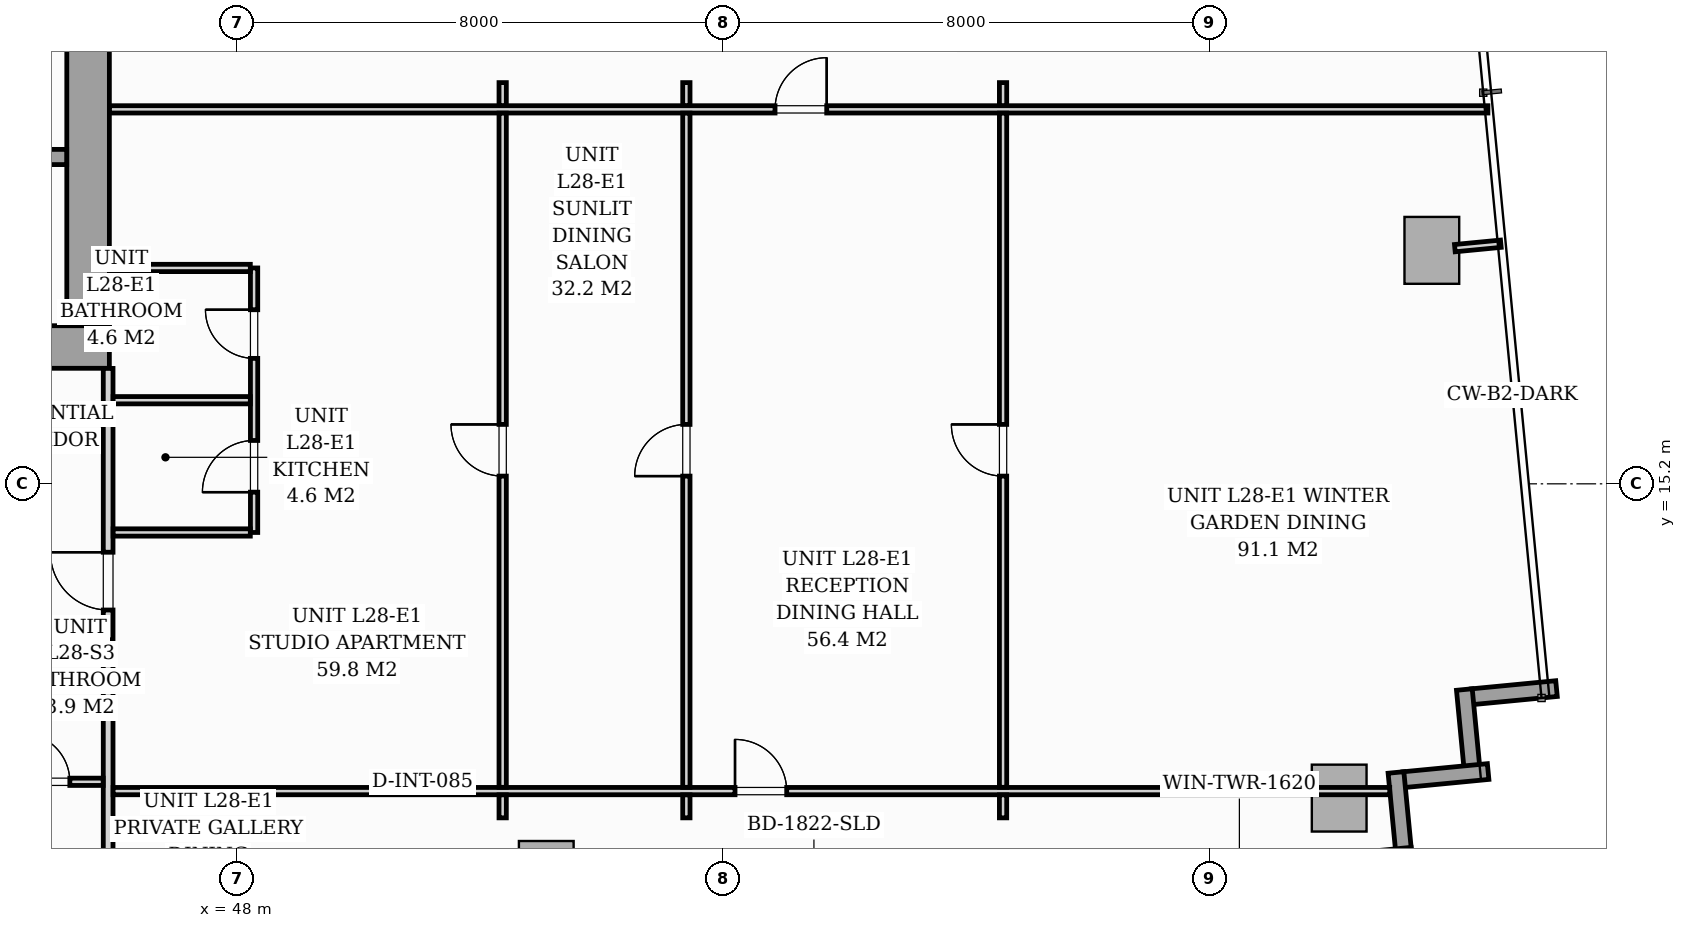
"""IFC4 building model, lengths in metres.
Left out: names, types, materials, properties, quantities, classifications, styles, units other than length and angle.
Written with IfcOpenShell. Run it as: python <this file> out.ifc"""

import sys

from ifc_helpers import new_model, si_unit, direction, frame, frame_2d, origin, origin_2d, place, context, subcontext, project, spatial, rectangle, i_section, extrude, source, transform, mapped, element, fill, save


model = new_model("IFC4")
c1 = context("Model", 3, precision=1e-05, world=origin(), true_north=direction((0.0, 1.0)))
c2 = subcontext(c1, "Body", "Model", "MODEL_VIEW")
j1 = project(units=[si_unit("LENGTHUNIT", "METRE"), si_unit("PLANEANGLEUNIT", "RADIAN")], contexts=[c1])
p1 = place(None, origin())
s1 = spatial("IfcSite", under=j1, at=p1, CompositionType="ELEMENT")
p2 = place(p1, origin())
s2 = spatial("IfcBuilding", under=s1, at=p2, CompositionType="ELEMENT")
p3 = place(p2, frame((0.0, 0.0, 100.2)))
s3 = spatial("IfcBuildingStorey", under=s2, at=p3, CompositionType="ELEMENT", Elevation=100.2)
m1 = source(origin(), c2, "Body", "SweptSolid", [
    extrude(i_section(OverallWidth=0.427, OverallDepth=0.483, WebThickness=0.051, FlangeThickness=0.082, FilletRadius=0.018, at=origin_2d()), origin(), (0.0, 0.0, 1.0), 3.196),
])
p4 = place(p3, frame((45.6, 17.4, 0.002), z_axis=(0.0, 0.0, 1.0), x_axis=(1.0, 0.0, 0.0)))
e1 = element("IfcColumn", 1, at=p4, inside=s3, PredefinedType="PILASTER", context=c2, shape_type="MappedRepresentation", body=[
    mapped(m1, transform((0.0, 0.0, 0.0), scale=1.0)),
])
m2 = source(origin(), c2, "Body", "SweptSolid", [
    extrude(rectangle(XDim=0.9, YDim=1.1, at=origin_2d()), origin(), (0.0, 0.0, 1.0), 3.196),
])
for number, where, z_axis, x_axis in (
    (2, (53.085, 8.776, 0.002), (0.0, 0.0, 1.0), (0.995, 0.096, 0.0)),
    (3, (66.125, 10.032, 0.002), (0.0, 0.0, 1.0), (0.995, 0.096, 0.0)),
    (4, (67.648, 19.039, 0.002), (0.0, 0.0, 1.0), (0.995, 0.096, 0.0)),
):
    element("IfcColumn", number, at=place(p3, frame(where, z_axis=z_axis, x_axis=x_axis)), inside=s3, PredefinedType="COLUMN", context=c2, shape_type="MappedRepresentation", body=[
        mapped(m2, transform((0.0, 0.0, 0.0), scale=1.0)),
    ])
for number, where, z_axis, x_axis in (
    (5, (69.698, 11.833, 0.0), (0.0, 0.0, 1.0), (-0.995, -0.096, 0.0)),
    (6, (68.183, 11.817, 0.0), (0.0, 0.0, 1.0), (0.096, -0.995, 0.0)),
):
    element("IfcWall", number, at=place(p3, frame(where, z_axis=z_axis, x_axis=x_axis)), inside=s3, PredefinedType="STANDARD", context=c2, shape_type="SweptSolid", body=[
        extrude(rectangle(XDim=1.395, YDim=0.26, at=frame_2d((0.697, 0.0))), origin(), (0.0, 0.0, 1.0), 2.94),
    ])
p5 = place(p3, frame((68.574, 10.469, 0.0), z_axis=(0.0, 0.0, 1.0), x_axis=(-0.99540774648, -0.095725744959, 0.0)))
e7 = element("IfcWall", 7, at=p5, inside=s3, PredefinedType="STANDARD", context=c2, shape_type="SweptSolid", body=[
    extrude(rectangle(XDim=1.395, YDim=0.26, at=frame_2d((0.698, 0.0))), origin(), (0.0, 0.0, 1.0), 2.94),
])
p6 = place(p3, frame((67.059, 10.453, 0.0), z_axis=(0.0, 0.0, 1.0), x_axis=(0.095915846097, -0.995389446633, 0.0)))
e8 = element("IfcWall", 8, at=p6, inside=s3, PredefinedType="STANDARD", context=c2, shape_type="SweptSolid", body=[
    extrude(rectangle(XDim=1.395, YDim=0.26, at=frame_2d((0.697, 0.0))), origin(), (0.0, 0.0, 1.0), 2.94),
])
p7 = place(p3, frame((67.32, 9.092, 0.0), z_axis=(0.0, 0.0, 1.0), x_axis=(-0.995396521236, -0.095842399342, 0.0)))
e9 = element("IfcWall", 9, at=p7, inside=s3, PredefinedType="STANDARD", context=c2, shape_type="SweptSolid", body=[
    extrude(rectangle(XDim=19.11, YDim=0.26, at=frame_2d((9.555, 0.0))), origin(), (0.0, 0.0, 1.0), 2.94),
])
p8 = place(p7, frame((8.979, 0.0, 0.0)))
e10 = element("IfcOpeningElement", 10, at=p8, cuts=e9, PredefinedType="OPENING", context=c2, shape_type="SweptSolid", body=[
    extrude(rectangle(XDim=1.8, YDim=2.06, at=frame_2d((0.9, 1.03))), frame((0.0, 0.14, 0.0), z_axis=(0.0, -1.0, 0.0), x_axis=(1.0, 0.0, 0.0)), (0.0, 0.0, 1.0), 0.28),
])
p9 = place(p7, frame((2.05, 0.0, 0.65)))
e11 = element("IfcOpeningElement", 11, at=p9, cuts=e9, PredefinedType="OPENING", context=c2, shape_type="SweptSolid", body=[
    extrude(rectangle(XDim=1.6, YDim=1.5, at=frame_2d((0.8, 0.75))), frame((0.0, 0.14, 0.0), z_axis=(0.0, -1.0, 0.0), x_axis=(1.0, 0.0, 0.0)), (0.0, 0.0, 1.0), 0.28),
])
p10 = place(p3, frame((26.1, 17.45, 0.0), z_axis=(0.0, 0.0, 1.0), x_axis=(1.0, 0.0, 0.0)))
e12 = element("IfcWall", 12, at=p10, inside=s3, PredefinedType="SHEAR", context=c2, shape_type="SweptSolid", body=[
    extrude(rectangle(XDim=19.8, YDim=0.7, at=frame_2d((9.9, 0.0))), origin(), (0.0, 0.0, 1.0), 3.2),
])
p11 = place(p10, frame((1.05, 0.0, 0.0)))
e13 = element("IfcOpeningElement", 13, at=p11, cuts=e12, PredefinedType="OPENING", context=c2, shape_type="SweptSolid", body=[
    extrude(rectangle(XDim=0.95, YDim=2.06, at=frame_2d((0.475, 1.03))), frame((0.0, 0.36, 0.0), z_axis=(0.0, -1.0, 0.0), x_axis=(1.0, 0.0, 0.0)), (0.0, 0.0, 1.0), 0.72),
])
p12 = place(p10, frame((9.48, 0.0, 0.0)))
e14 = element("IfcOpeningElement", 14, at=p12, cuts=e12, PredefinedType="OPENING", context=c2, shape_type="SweptSolid", body=[
    extrude(rectangle(XDim=0.85, YDim=2.0, at=frame_2d((0.425, 1.0))), frame((0.0, 0.36, 0.0), z_axis=(0.0, -1.0, 0.0), x_axis=(1.0, 0.0, 0.0)), (0.0, 0.0, 1.0), 0.72),
])
p13 = place(p10, frame((17.65, 0.0, 0.0)))
e15 = element("IfcOpeningElement", 15, at=p13, cuts=e12, PredefinedType="OPENING", context=c2, shape_type="SweptSolid", body=[
    extrude(rectangle(XDim=0.95, YDim=2.06, at=frame_2d((0.475, 1.03))), frame((0.0, 0.36, 0.0), z_axis=(0.0, -1.0, 0.0), x_axis=(1.0, 0.0, 0.0)), (0.0, 0.0, 1.0), 0.72),
])
p14 = place(p3, frame((45.55, 17.802, 0.0), z_axis=(0.0, 0.0, 1.0), x_axis=(0.0, 1.0, 0.0)))
e16 = element("IfcWall", 16, at=p14, inside=s3, PredefinedType="SHEAR", context=c2, shape_type="SweptSolid", body=[
    extrude(rectangle(XDim=5.796, YDim=0.7, at=frame_2d((2.898, 0.0))), origin(), (0.0, 0.0, 1.0), 3.2),
])
p15 = place(p3, frame((37.05, 20.575, 0.0), z_axis=(0.0, 0.0, 1.0), x_axis=(1.0, 0.0, 0.0)))
e17 = element("IfcWall", 17, at=p15, inside=s3, PredefinedType="SOLIDWALL", context=c2, shape_type="SweptSolid", body=[
    extrude(rectangle(XDim=8.148, YDim=0.25, at=frame_2d((4.074, 0.0))), origin(), (0.0, 0.0, 1.0), 3.2),
])
p16 = place(p15, frame((6.6, 0.0, 0.0)))
e18 = element("IfcOpeningElement", 18, at=p16, cuts=e17, PredefinedType="OPENING", context=c2, shape_type="SweptSolid", body=[
    extrude(rectangle(XDim=0.95, YDim=2.06, at=frame_2d((0.475, 1.03))), frame((0.0, 0.135, 0.0), z_axis=(0.0, -1.0, 0.0), x_axis=(1.0, 0.0, 0.0)), (0.0, 0.0, 1.0), 0.27),
])
p17 = place(p3, frame((21.5, 12.55, 0.0), z_axis=(0.0, 0.0, 1.0), x_axis=(1.0, 0.0, 0.0)))
e19 = element("IfcWall", 19, at=p17, inside=s3, PredefinedType="PARTITIONING", context=c2, shape_type="SweptSolid", body=[
    extrude(rectangle(XDim=24.38, YDim=0.16, at=frame_2d((12.19, 0.0))), origin(), (0.0, 0.0, 1.0), 2.94),
])
p18 = place(p17, frame((6.075, 0.0, 0.0)))
e20 = element("IfcOpeningElement", 20, at=p18, cuts=e19, PredefinedType="OPENING", context=c2, shape_type="SweptSolid", body=[
    extrude(rectangle(XDim=0.95, YDim=2.06, at=frame_2d((0.475, 1.03))), frame((0.0, 0.09, 0.0), z_axis=(0.0, -1.0, 0.0), x_axis=(1.0, 0.0, 0.0)), (0.0, 0.0, 1.0), 0.18),
])
p19 = place(p17, frame((10.519, 0.0, 0.0)))
e21 = element("IfcOpeningElement", 21, at=p19, cuts=e19, PredefinedType="OPENING", context=c2, shape_type="SweptSolid", body=[
    extrude(rectangle(XDim=0.95, YDim=2.06, at=frame_2d((0.475, 1.03))), frame((0.0, 0.09, 0.0), z_axis=(0.0, -1.0, 0.0), x_axis=(1.0, 0.0, 0.0)), (0.0, 0.0, 1.0), 0.18),
])
p20 = place(p17, frame((18.208, 0.0, 0.0)))
e22 = element("IfcOpeningElement", 22, at=p20, cuts=e19, PredefinedType="OPENING", context=c2, shape_type="SweptSolid", body=[
    extrude(rectangle(XDim=0.95, YDim=2.06, at=frame_2d((0.475, 1.03))), frame((0.0, 0.09, 0.0), z_axis=(0.0, -1.0, 0.0), x_axis=(1.0, 0.0, 0.0)), (0.0, 0.0, 1.0), 0.18),
])
p21 = place(p3, frame((45.88, 6.977, 0.0), z_axis=(0.0, 0.0, 1.0), x_axis=(0.0, 1.0, 0.0)))
e23 = element("IfcWall", 23, at=p21, inside=s3, PredefinedType="PARTITIONING", context=c2, shape_type="SweptSolid", body=[
    extrude(rectangle(XDim=5.491, YDim=0.16, at=frame_2d((2.745, 0.0))), origin(), (0.0, 0.0, 1.0), 2.94),
])
p22 = place(p3, frame((45.88, 12.632, 0.0), z_axis=(0.0, 0.0, 1.0), x_axis=(0.0, 1.0, 0.0)))
e24 = element("IfcWall", 24, at=p22, inside=s3, PredefinedType="PARTITIONING", context=c2, shape_type="SweptSolid", body=[
    extrude(rectangle(XDim=4.466, YDim=0.16, at=frame_2d((2.233, 0.0))), origin(), (0.0, 0.0, 1.0), 2.94),
])
p23 = place(p22, frame((0.493, 0.0, 0.0)))
e25 = element("IfcOpeningElement", 25, at=p23, cuts=e24, PredefinedType="OPENING", context=c2, shape_type="SweptSolid", body=[
    extrude(rectangle(XDim=0.95, YDim=2.06, at=frame_2d((0.475, 1.03))), frame((0.0, 0.09, 0.0), z_axis=(0.0, -1.0, 0.0), x_axis=(1.0, 0.0, 0.0)), (0.0, 0.0, 1.0), 0.18),
])
p24 = place(p3, frame((41.7, 10.3, 0.0), z_axis=(0.0, 0.0, 1.0), x_axis=(1.0, 0.0, 0.0)))
e26 = element("IfcWall", 26, at=p24, inside=s3, PredefinedType="PARTITIONING", context=c2, shape_type="SweptSolid", body=[
    extrude(rectangle(XDim=4.098, YDim=0.12, at=frame_2d((2.049, 0.0))), origin(), (0.0, 0.0, 1.0), 2.94),
])
p25 = place(p24, frame((0.675, 0.0, 0.0)))
e27 = element("IfcOpeningElement", 27, at=p25, cuts=e26, PredefinedType="OPENING", context=c2, shape_type="SweptSolid", body=[
    extrude(rectangle(XDim=0.85, YDim=2.05, at=frame_2d((0.425, 1.025))), frame((0.0, 0.07, 0.0), z_axis=(0.0, -1.0, 0.0), x_axis=(1.0, 0.0, 0.0)), (0.0, 0.0, 1.0), 0.14),
])
p26 = place(p24, frame((2.75, 0.0, 0.0)))
e28 = element("IfcOpeningElement", 28, at=p26, cuts=e26, PredefinedType="OPENING", context=c2, shape_type="SweptSolid", body=[
    extrude(rectangle(XDim=0.8, YDim=2.02, at=frame_2d((0.4, 1.01))), frame((0.0, 0.07, 0.0), z_axis=(0.0, -1.0, 0.0), x_axis=(1.0, 0.0, 0.0)), (0.0, 0.0, 1.0), 0.14),
])
p27 = place(p3, frame((48.28, 14.4, 0.0), z_axis=(0.0, 0.0, 1.0), x_axis=(0.0, 1.0, 0.0)))
e29 = element("IfcWall", 29, at=p27, inside=s3, PredefinedType="PARTITIONING", context=c2, shape_type="SweptSolid", body=[
    extrude(rectangle(XDim=4.35, YDim=0.12, at=frame_2d((2.175, 0.0))), origin(), (0.0, 0.0, 1.0), 2.94),
])
p28 = place(p27, frame((0.663, 0.0, 0.0)))
e30 = element("IfcOpeningElement", 30, at=p28, cuts=e29, PredefinedType="OPENING", context=c2, shape_type="SweptSolid", body=[
    extrude(rectangle(XDim=0.85, YDim=2.05, at=frame_2d((0.425, 1.025))), frame((0.0, 0.07, 0.0), z_axis=(0.0, -1.0, 0.0), x_axis=(1.0, 0.0, 0.0)), (0.0, 0.0, 1.0), 0.14),
])
p29 = place(p27, frame((2.863, 0.0, 0.0)))
e31 = element("IfcOpeningElement", 31, at=p29, cuts=e29, PredefinedType="OPENING", context=c2, shape_type="SweptSolid", body=[
    extrude(rectangle(XDim=0.8, YDim=2.02, at=frame_2d((0.4, 1.01))), frame((0.0, 0.07, 0.0), z_axis=(0.0, -1.0, 0.0), x_axis=(1.0, 0.0, 0.0)), (0.0, 0.0, 1.0), 0.14),
])
for number, where, z_axis, x_axis in (
    (32, (45.962, 16.575, 0.0), (0.0, 0.0, 1.0), (1.0, 0.0, 0.0)),
    (33, (45.962, 14.4, 0.0), (0.0, 0.0, 1.0), (1.0, 0.0, 0.0)),
):
    element("IfcWall", number, at=place(p3, frame(where, z_axis=z_axis, x_axis=x_axis)), inside=s3, PredefinedType="PARTITIONING", context=c2, shape_type="SweptSolid", body=[
        extrude(rectangle(XDim=2.256, YDim=0.12, at=frame_2d((1.128, 0.0))), origin(), (0.0, 0.0, 1.0), 2.94),
    ])
p30 = place(p3, frame((45.902, 18.75, 0.0), z_axis=(0.0, 0.0, 1.0), x_axis=(1.0, 0.0, 0.0)))
e34 = element("IfcWall", 34, at=p30, inside=s3, PredefinedType="PARTITIONING", context=c2, shape_type="SweptSolid", body=[
    extrude(rectangle(XDim=2.316, YDim=0.12, at=frame_2d((1.158, 0.0))), origin(), (0.0, 0.0, 1.0), 2.94),
])
p31 = place(p3, frame((45.902, 21.358, 0.0), z_axis=(0.0, 0.0, 1.0), x_axis=(1.0, 0.0, 0.0)))
e35 = element("IfcWall", 35, at=p31, inside=s3, PredefinedType="PARTITIONING", context=c2, shape_type="SweptSolid", body=[
    extrude(rectangle(XDim=22.668, YDim=0.12, at=frame_2d((11.334, 0.0))), origin(), (0.0, 0.0, 1.0), 2.94),
])
p32 = place(p31, frame((10.945, 0.0, 0.0)))
e36 = element("IfcOpeningElement", 36, at=p32, cuts=e35, PredefinedType="OPENING", context=c2, shape_type="SweptSolid", body=[
    extrude(rectangle(XDim=0.85, YDim=2.05, at=frame_2d((0.425, 1.025))), frame((0.0, 0.07, 0.0), z_axis=(0.0, -1.0, 0.0), x_axis=(1.0, 0.0, 0.0)), (0.0, 0.0, 1.0), 0.14),
])
p33 = place(p3, frame((45.962, 10.147, 0.0), z_axis=(0.0, 0.0, 1.0), x_axis=(1.0, 0.0, 0.0)))
e37 = element("IfcWall", 37, at=p33, inside=s3, PredefinedType="PARTITIONING", context=c2, shape_type="SweptSolid", body=[
    extrude(rectangle(XDim=20.994, YDim=0.12, at=frame_2d((10.497, 0.0))), origin(), (0.0, 0.0, 1.0), 2.31),
])
p34 = place(p33, frame((10.227, 0.0, 0.0)))
e38 = element("IfcOpeningElement", 38, at=p34, cuts=e37, PredefinedType="OPENING", context=c2, shape_type="SweptSolid", body=[
    extrude(rectangle(XDim=0.85, YDim=2.05, at=frame_2d((0.425, 1.025))), frame((0.0, 0.07, 0.0), z_axis=(0.0, -1.0, 0.0), x_axis=(1.0, 0.0, 0.0)), (0.0, 0.0, 1.0), 0.14),
])
p35 = place(p3, frame((60.597, 9.707, 0.0), z_axis=(0.0, 0.0, 1.0), x_axis=(0.0, 1.0, 0.0)))
e39 = element("IfcWall", 39, at=p35, inside=s3, PredefinedType="PARTITIONING", context=c2, shape_type="SweptSolid", body=[
    extrude(rectangle(XDim=0.378, YDim=0.12, at=frame_2d((0.189, 0.0))), origin(), (0.0, 0.0, 1.0), 2.94),
])
p36 = place(p3, frame((60.597, 10.209, 0.0), z_axis=(0.0, 0.0, 1.0), x_axis=(0.0, 1.0, 0.0)))
e40 = element("IfcWall", 40, at=p36, inside=s3, PredefinedType="PARTITIONING", context=c2, shape_type="SweptSolid", body=[
    extrude(rectangle(XDim=11.087, YDim=0.12, at=frame_2d((5.543, 0.0))), origin(), (0.0, 0.0, 1.0), 2.94),
])
p37 = place(p36, frame((5.118, 0.0, 0.0)))
e41 = element("IfcOpeningElement", 41, at=p37, cuts=e40, PredefinedType="OPENING", context=c2, shape_type="SweptSolid", body=[
    extrude(rectangle(XDim=0.85, YDim=2.05, at=frame_2d((0.425, 1.025))), frame((0.0, 0.07, 0.0), z_axis=(0.0, -1.0, 0.0), x_axis=(1.0, 0.0, 0.0)), (0.0, 0.0, 1.0), 0.14),
])
p38 = place(p3, frame((60.597, 21.42, 0.0), z_axis=(0.0, 0.0, 1.0), x_axis=(0.0, 1.0, 0.0)))
e42 = element("IfcWall", 42, at=p38, inside=s3, PredefinedType="PARTITIONING", context=c2, shape_type="SweptSolid", body=[
    extrude(rectangle(XDim=0.378, YDim=0.12, at=frame_2d((0.189, 0.0))), origin(), (0.0, 0.0, 1.0), 2.94),
])
p39 = place(p3, frame((55.389, 9.707, 0.0), z_axis=(0.0, 0.0, 1.0), x_axis=(0.0, 1.0, 0.0)))
e43 = element("IfcWall", 43, at=p39, inside=s3, PredefinedType="PARTITIONING", context=c2, shape_type="SweptSolid", body=[
    extrude(rectangle(XDim=0.378, YDim=0.12, at=frame_2d((0.189, 0.0))), origin(), (0.0, 0.0, 1.0), 2.94),
])
p40 = place(p3, frame((55.389, 10.209, 0.0), z_axis=(0.0, 0.0, 1.0), x_axis=(0.0, 1.0, 0.0)))
e44 = element("IfcWall", 44, at=p40, inside=s3, PredefinedType="PARTITIONING", context=c2, shape_type="SweptSolid", body=[
    extrude(rectangle(XDim=11.087, YDim=0.12, at=frame_2d((5.543, 0.0))), origin(), (0.0, 0.0, 1.0), 2.94),
])
p41 = place(p40, frame((5.118, 0.0, 0.0)))
e45 = element("IfcOpeningElement", 45, at=p41, cuts=e44, PredefinedType="OPENING", context=c2, shape_type="SweptSolid", body=[
    extrude(rectangle(XDim=0.85, YDim=2.05, at=frame_2d((0.425, 1.025))), frame((0.0, 0.07, 0.0), z_axis=(0.0, -1.0, 0.0), x_axis=(1.0, 0.0, 0.0)), (0.0, 0.0, 1.0), 0.14),
])
p42 = place(p3, frame((55.389, 21.42, 0.0), z_axis=(0.0, 0.0, 1.0), x_axis=(0.0, 1.0, 0.0)))
e46 = element("IfcWall", 46, at=p42, inside=s3, PredefinedType="PARTITIONING", context=c2, shape_type="SweptSolid", body=[
    extrude(rectangle(XDim=0.378, YDim=0.12, at=frame_2d((0.189, 0.0))), origin(), (0.0, 0.0, 1.0), 2.94),
])
p43 = place(p3, frame((52.368, 9.707, 0.0), z_axis=(0.0, 0.0, 1.0), x_axis=(0.0, 1.0, 0.0)))
e47 = element("IfcWall", 47, at=p43, inside=s3, PredefinedType="PARTITIONING", context=c2, shape_type="SweptSolid", body=[
    extrude(rectangle(XDim=0.378, YDim=0.12, at=frame_2d((0.189, 0.0))), origin(), (0.0, 0.0, 1.0), 2.94),
])
p44 = place(p3, frame((52.368, 10.209, 0.0), z_axis=(0.0, 0.0, 1.0), x_axis=(0.0, 1.0, 0.0)))
e48 = element("IfcWall", 48, at=p44, inside=s3, PredefinedType="PARTITIONING", context=c2, shape_type="SweptSolid", body=[
    extrude(rectangle(XDim=11.087, YDim=0.12, at=frame_2d((5.543, 0.0))), origin(), (0.0, 0.0, 1.0), 2.94),
])
p45 = place(p44, frame((5.118, 0.0, 0.0)))
e49 = element("IfcOpeningElement", 49, at=p45, cuts=e48, PredefinedType="OPENING", context=c2, shape_type="SweptSolid", body=[
    extrude(rectangle(XDim=0.85, YDim=2.05, at=frame_2d((0.425, 1.025))), frame((0.0, 0.07, 0.0), z_axis=(0.0, -1.0, 0.0), x_axis=(1.0, 0.0, 0.0)), (0.0, 0.0, 1.0), 0.14),
])
p46 = place(p3, frame((52.368, 21.42, 0.0), z_axis=(0.0, 0.0, 1.0), x_axis=(0.0, 1.0, 0.0)))
e50 = element("IfcWall", 50, at=p46, inside=s3, PredefinedType="PARTITIONING", context=c2, shape_type="SweptSolid", body=[
    extrude(rectangle(XDim=0.378, YDim=0.12, at=frame_2d((0.189, 0.0))), origin(), (0.0, 0.0, 1.0), 2.94),
])
p47 = place(p3, frame((68.027, 19.076, 0.0), z_axis=(0.0, 0.0, 1.0), x_axis=(0.995377786728, 0.096036772582, 0.0)))
e51 = element("IfcWall", 51, at=p47, inside=s3, PredefinedType="PARTITIONING", context=c2, shape_type="SweptSolid", body=[
    extrude(rectangle(XDim=0.76, YDim=0.12, at=frame_2d((0.38, 0.0))), origin(), (0.0, 0.0, 1.0), 2.94),
])
m3 = source(origin(), c2, "Body", "SweptSolid", [
    extrude(rectangle(XDim=0.8, YDim=2.02, at=frame_2d((0.4, 1.01))), frame((0.0, 0.025, 0.0), z_axis=(0.0, -1.0, 0.0), x_axis=(1.0, 0.0, 0.0)), (0.0, 0.0, 1.0), 0.05),
])
p48 = place(p26, origin())
e52 = element("IfcDoor", 52, at=p48, inside=s3, OperationType="SINGLE_SWING_LEFT", PredefinedType="DOOR", context=c2, shape_type="MappedRepresentation", body=[
    mapped(m3, transform((0.0, 0.0, 0.0), scale=1.0)),
])
fill(e28, e52)
m4 = source(origin(), c2, "Body", "SweptSolid", [
    extrude(rectangle(XDim=0.95, YDim=2.06, at=frame_2d((0.475, 1.03))), frame((0.0, 0.025, 0.0), z_axis=(0.0, -1.0, 0.0), x_axis=(1.0, 0.0, 0.0)), (0.0, 0.0, 1.0), 0.05),
])
p49 = place(p23, origin())
e53 = element("IfcDoor", 53, at=p49, inside=s3, OperationType="SINGLE_SWING_RIGHT", PredefinedType="DOOR", context=c2, shape_type="MappedRepresentation", body=[
    mapped(m4, transform((0.0, 0.0, 0.0), scale=1.0)),
])
fill(e25, e53)
m5 = source(origin(), c2, "Body", "SweptSolid", [
    extrude(rectangle(XDim=0.85, YDim=2.05, at=frame_2d((0.425, 1.025))), frame((0.0, 0.025, 0.0), z_axis=(0.0, -1.0, 0.0), x_axis=(1.0, 0.0, 0.0)), (0.0, 0.0, 1.0), 0.05),
])
p50 = place(p28, origin())
e54 = element("IfcDoor", 54, at=p50, inside=s3, OperationType="SINGLE_SWING_LEFT", PredefinedType="DOOR", context=c2, shape_type="MappedRepresentation", body=[
    mapped(m5, transform((0.0, 0.0, 0.0), scale=1.0)),
])
fill(e30, e54)
p51 = place(p29, origin())
e55 = element("IfcDoor", 55, at=p51, inside=s3, OperationType="SINGLE_SWING_RIGHT", PredefinedType="DOOR", context=c2, shape_type="MappedRepresentation", body=[
    mapped(m3, transform((0.0, 0.0, 0.0), scale=1.0)),
])
fill(e31, e55)
p52 = place(p32, origin())
e56 = element("IfcDoor", 56, at=p52, inside=s3, OperationType="SINGLE_SWING_RIGHT", PredefinedType="DOOR", context=c2, shape_type="MappedRepresentation", body=[
    mapped(m5, transform((0.0, 0.0, 0.0), scale=1.0)),
])
fill(e36, e56)
p53 = place(p34, origin())
e57 = element("IfcDoor", 57, at=p53, inside=s3, OperationType="SINGLE_SWING_LEFT", PredefinedType="DOOR", context=c2, shape_type="MappedRepresentation", body=[
    mapped(m5, transform((0.0, 0.0, 0.0), scale=1.0)),
])
fill(e38, e57)
p54 = place(p37, origin())
e58 = element("IfcDoor", 58, at=p54, inside=s3, OperationType="SINGLE_SWING_RIGHT", PredefinedType="DOOR", context=c2, shape_type="MappedRepresentation", body=[
    mapped(m5, transform((0.0, 0.0, 0.0), scale=1.0)),
])
fill(e41, e58)
p55 = place(p41, origin())
e59 = element("IfcDoor", 59, at=p55, inside=s3, OperationType="SINGLE_SWING_LEFT", PredefinedType="DOOR", context=c2, shape_type="MappedRepresentation", body=[
    mapped(m5, transform((0.0, 0.0, 0.0), scale=1.0)),
])
fill(e45, e59)
p56 = place(p45, origin())
e60 = element("IfcDoor", 60, at=p56, inside=s3, OperationType="SINGLE_SWING_RIGHT", PredefinedType="DOOR", context=c2, shape_type="MappedRepresentation", body=[
    mapped(m5, transform((0.0, 0.0, 0.0), scale=1.0)),
])
fill(e49, e60)
save(model, sys.argv[1])
